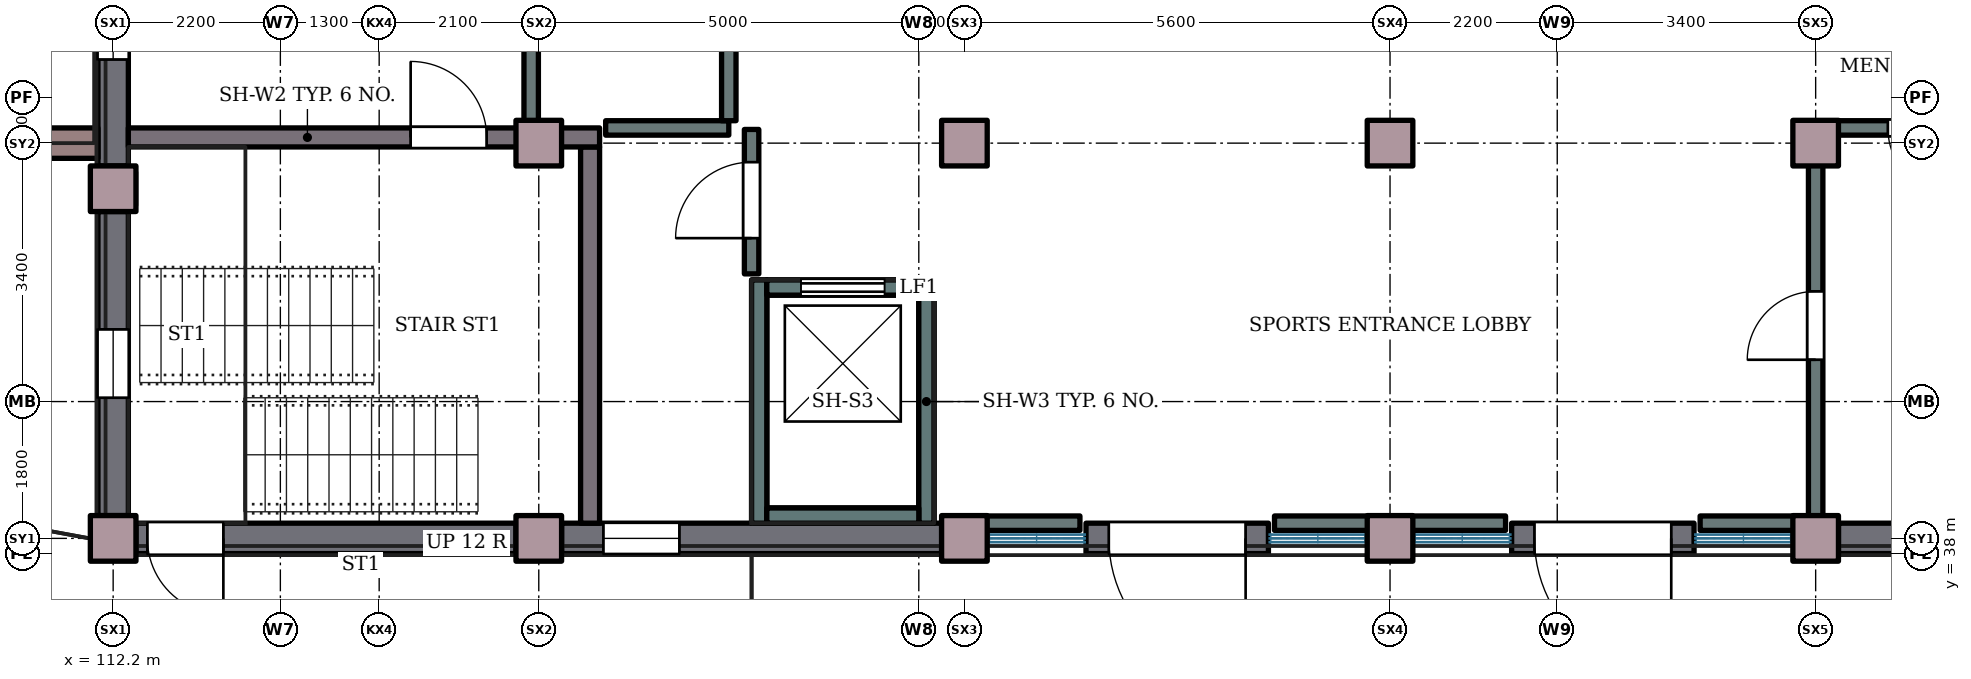
"""IFC4 building model, lengths in metres.
Left out: names, types, materials, properties, quantities, classifications, styles, units other than length and angle.
Written with IfcOpenShell. Run it as: python <this file> out.ifc"""

import sys

from ifc_helpers import new_model, si_unit, direction, frame, frame_2d, origin, origin_2d, place, context, subcontext, project, spatial, rectangle, extrude, element, fill, save


model = new_model("IFC4")
c1 = context("Model", 3, precision=1e-05, world=origin(), true_north=direction((0.0, 1.0)))
c2 = subcontext(c1, "Body", "Model", "MODEL_VIEW")
j1 = project(units=[si_unit("LENGTHUNIT", "METRE"), si_unit("PLANEANGLEUNIT", "RADIAN")], contexts=[c1])
p1 = place(None, origin())
s1 = spatial("IfcSite", under=j1, at=p1, CompositionType="ELEMENT")
p2 = place(p1, origin())
s2 = spatial("IfcBuilding", under=s1, at=p2, CompositionType="ELEMENT")
p3 = place(p2, origin())
s3 = spatial("IfcBuildingStorey", under=s2, at=p3, CompositionType="ELEMENT", Elevation=0.0)
for number, where, z_axis, x_axis in (
    (1, (112.2, 38.2, 0.0), (0.0, 0.0, 1.0), (1.0, 0.0, 0.0)),
    (2, (117.8, 38.2, 0.0), (0.0, 0.0, 1.0), (1.0, 0.0, 0.0)),
    (3, (123.4, 38.2, 0.0), (0.0, 0.0, 1.0), (1.0, 0.0, 0.0)),
    (4, (129.0, 38.2, 0.0), (0.0, 0.0, 1.0), (1.0, 0.0, 0.0)),
    (5, (134.6, 38.2, 0.0), (0.0, 0.0, 1.0), (1.0, 0.0, 0.0)),
    (6, (112.2, 42.8, 0.0), (0.0, 0.0, 1.0), (1.0, 0.0, 0.0)),
    (7, (117.8, 43.4, 0.0), (0.0, 0.0, 1.0), (1.0, 0.0, 0.0)),
    (8, (123.4, 43.4, 0.0), (0.0, 0.0, 1.0), (1.0, 0.0, 0.0)),
    (9, (129.0, 43.4, 0.0), (0.0, 0.0, 1.0), (1.0, 0.0, 0.0)),
    (10, (134.6, 43.4, 0.0), (0.0, 0.0, 1.0), (1.0, 0.0, 0.0)),
):
    element("IfcColumn", number, at=place(p3, frame(where, z_axis=z_axis, x_axis=x_axis)), inside=s3, PredefinedType="COLUMN", context=c2, shape_type="SweptSolid", body=[
        extrude(rectangle(XDim=0.6, YDim=0.6, at=origin_2d()), origin(), (0.0, 0.0, 1.0), 4.2),
    ])
p4 = place(p3, frame((117.5, 38.2, 0.0), z_axis=(0.0, 0.0, 1.0), x_axis=(-1.0, 0.0, 0.0)))
e11 = element("IfcWall", 11, at=p4, inside=s3, PredefinedType="SOLIDWALL", context=c2, shape_type="SweptSolid", body=[
    extrude(rectangle(XDim=5.0, YDim=0.4, at=frame_2d((2.5, 0.0))), origin(), (0.0, 0.0, 1.0), 4.2),
])
p5 = place(p4, frame((3.85, 0.0, 0.0)))
e12 = element("IfcOpeningElement", 12, at=p5, cuts=e11, PredefinedType="OPENING", context=c2, shape_type="SweptSolid", body=[
    extrude(rectangle(XDim=1.0, YDim=2.4, at=frame_2d((0.5, 1.2))), frame((0.0, 0.21, 0.0), z_axis=(0.0, -1.0, 0.0), x_axis=(1.0, 0.0, 0.0)), (0.0, 0.0, 1.0), 0.42),
])
p6 = place(p3, frame((123.1, 38.2, 0.0), z_axis=(0.0, 0.0, 1.0), x_axis=(-1.0, 0.0, 0.0)))
e13 = element("IfcWall", 13, at=p6, inside=s3, PredefinedType="SOLIDWALL", context=c2, shape_type="SweptSolid", body=[
    extrude(rectangle(XDim=5.0, YDim=0.4, at=frame_2d((2.5, 0.0))), origin(), (0.0, 0.0, 1.0), 4.2),
])
p7 = place(p6, frame((3.45, 0.0, 1.0)))
e14 = element("IfcOpeningElement", 14, at=p7, cuts=e13, PredefinedType="OPENING", context=c2, shape_type="SweptSolid", body=[
    extrude(rectangle(XDim=1.0, YDim=1.2, at=frame_2d((0.5, 0.6))), frame((0.0, 0.21, 0.0), z_axis=(0.0, -1.0, 0.0), x_axis=(1.0, 0.0, 0.0)), (0.0, 0.0, 1.0), 0.42),
])
p8 = place(p3, frame((127.4, 38.2, 0.0), z_axis=(0.0, 0.0, 1.0), x_axis=(-1.0, 0.0, 0.0)))
e15 = element("IfcWall", 15, at=p8, inside=s3, PredefinedType="SOLIDWALL", context=c2, shape_type="SweptSolid", body=[
    extrude(rectangle(XDim=2.4, YDim=0.4, at=frame_2d((1.2, 0.0))), origin(), (0.0, 0.0, 1.0), 4.2),
])
p9 = place(p8, frame((0.3, 0.0, 0.0)))
e16 = element("IfcOpeningElement", 16, at=p9, cuts=e15, PredefinedType="OPENING", context=c2, shape_type="SweptSolid", body=[
    extrude(rectangle(XDim=1.8, YDim=2.4, at=frame_2d((0.9, 1.2))), frame((0.0, 0.21, 0.0), z_axis=(0.0, -1.0, 0.0), x_axis=(1.0, 0.0, 0.0)), (0.0, 0.0, 1.0), 0.42),
])
p10 = place(p3, frame((133.0, 38.2, 0.0), z_axis=(0.0, 0.0, 1.0), x_axis=(-1.0, 0.0, 0.0)))
e17 = element("IfcWall", 17, at=p10, inside=s3, PredefinedType="SOLIDWALL", context=c2, shape_type="SweptSolid", body=[
    extrude(rectangle(XDim=2.4, YDim=0.4, at=frame_2d((1.2, 0.0))), origin(), (0.0, 0.0, 1.0), 4.2),
])
p11 = place(p10, frame((0.3, 0.0, 0.0)))
e18 = element("IfcOpeningElement", 18, at=p11, cuts=e17, PredefinedType="OPENING", context=c2, shape_type="SweptSolid", body=[
    extrude(rectangle(XDim=1.8, YDim=2.4, at=frame_2d((0.9, 1.2))), frame((0.0, 0.21, 0.0), z_axis=(0.0, -1.0, 0.0), x_axis=(1.0, 0.0, 0.0)), (0.0, 0.0, 1.0), 0.42),
])
p12 = place(p3, frame((139.9, 38.2, 0.0), z_axis=(0.0, 0.0, 1.0), x_axis=(-1.0, 0.0, 0.0)))
e19 = element("IfcWall", 19, at=p12, inside=s3, PredefinedType="SOLIDWALL", context=c2, shape_type="SweptSolid", body=[
    extrude(rectangle(XDim=5.0, YDim=0.4, at=frame_2d((2.5, 0.0))), origin(), (0.0, 0.0, 1.0), 4.2),
])
p13 = place(p12, frame((3.6, 0.0, 1.6)))
e20 = element("IfcOpeningElement", 20, at=p13, cuts=e19, PredefinedType="OPENING", context=c2, shape_type="SweptSolid", body=[
    extrude(rectangle(XDim=0.6, YDim=0.6, at=frame_2d((0.3, 0.3))), frame((0.0, 0.21, 0.0), z_axis=(0.0, -1.0, 0.0), x_axis=(1.0, 0.0, 0.0)), (0.0, 0.0, 1.0), 0.42),
])
p14 = place(p12, frame((0.9, 0.0, 1.6)))
e21 = element("IfcOpeningElement", 21, at=p14, cuts=e19, PredefinedType="OPENING", context=c2, shape_type="SweptSolid", body=[
    extrude(rectangle(XDim=0.6, YDim=0.6, at=frame_2d((0.3, 0.3))), frame((0.0, 0.21, 0.0), z_axis=(0.0, -1.0, 0.0), x_axis=(1.0, 0.0, 0.0)), (0.0, 0.0, 1.0), 0.42),
])
p15 = place(p3, frame((112.2, 38.5, 0.0), z_axis=(0.0, 0.0, 1.0), x_axis=(0.0, 1.0, 0.0)))
e22 = element("IfcWall", 22, at=p15, inside=s3, PredefinedType="SOLIDWALL", context=c2, shape_type="SweptSolid", body=[
    extrude(rectangle(XDim=4.0, YDim=0.4, at=frame_2d((2.0, 0.0))), origin(), (0.0, 0.0, 1.0), 4.2),
])
p16 = place(p15, frame((1.55, 0.0, 0.9)))
e23 = element("IfcOpeningElement", 23, at=p16, cuts=e22, PredefinedType="OPENING", context=c2, shape_type="SweptSolid", body=[
    extrude(rectangle(XDim=0.9, YDim=1.5, at=frame_2d((0.45, 0.75))), frame((0.0, 0.21, 0.0), z_axis=(0.0, -1.0, 0.0), x_axis=(1.0, 0.0, 0.0)), (0.0, 0.0, 1.0), 0.42),
])
p17 = place(p3, frame((112.2, 43.1, 0.0), z_axis=(0.0, 0.0, 1.0), x_axis=(0.0, 1.0, 0.0)))
e24 = element("IfcWall", 24, at=p17, inside=s3, PredefinedType="SOLIDWALL", context=c2, shape_type="SweptSolid", body=[
    extrude(rectangle(XDim=4.0, YDim=0.4, at=frame_2d((2.0, 0.0))), origin(), (0.0, 0.0, 1.0), 4.2),
])
p18 = place(p17, frame((1.4, 0.0, 1.2)))
e25 = element("IfcOpeningElement", 25, at=p18, cuts=e24, PredefinedType="OPENING", context=c2, shape_type="SweptSolid", body=[
    extrude(rectangle(XDim=1.2, YDim=1.8, at=frame_2d((0.6, 0.9))), frame((0.0, 0.21, 0.0), z_axis=(0.0, -1.0, 0.0), x_axis=(1.0, 0.0, 0.0)), (0.0, 0.0, 1.0), 0.42),
])
p19 = place(p3, frame((118.475, 38.4, 0.0), z_axis=(0.0, 0.0, 1.0), x_axis=(0.0, 1.0, 0.0)))
e26 = element("IfcWall", 26, at=p19, inside=s3, PredefinedType="SHEAR", context=c2, shape_type="SweptSolid", body=[
    extrude(rectangle(XDim=4.95, YDim=0.25, at=frame_2d((2.475, 0.0))), origin(), (0.0, 0.0, 1.0), 4.2),
])
p20 = place(p3, frame((112.4, 43.475, 0.0), z_axis=(0.0, 0.0, 1.0), x_axis=(1.0, 0.0, 0.0)))
e27 = element("IfcWall", 27, at=p20, inside=s3, PredefinedType="SHEAR", context=c2, shape_type="SweptSolid", body=[
    extrude(rectangle(XDim=6.2, YDim=0.25, at=frame_2d((3.1, 0.0))), origin(), (0.0, 0.0, 1.0), 4.2),
])
p21 = place(p20, frame((3.714, 0.0, 0.0)))
e28 = element("IfcOpeningElement", 28, at=p21, cuts=e27, PredefinedType="OPENING", context=c2, shape_type="SweptSolid", body=[
    extrude(rectangle(XDim=1.0, YDim=2.1, at=frame_2d((0.5, 1.05))), frame((0.0, 0.135, 0.0), z_axis=(0.0, -1.0, 0.0), x_axis=(1.0, 0.0, 0.0)), (0.0, 0.0, 1.0), 0.27),
])
for number, where, z_axis, x_axis in (
    (29, (120.7, 38.4, 0.0), (0.0, 0.0, 1.0), (0.0, 1.0, 0.0)),
    (30, (122.9, 38.4, 0.0), (0.0, 0.0, 1.0), (0.0, 1.0, 0.0)),
):
    element("IfcWall", number, at=place(p3, frame(where, z_axis=z_axis, x_axis=x_axis)), inside=s3, PredefinedType="SHEAR", context=c2, shape_type="SweptSolid", body=[
        extrude(rectangle(XDim=3.2, YDim=0.2, at=frame_2d((1.6, 0.0))), origin(), (0.0, 0.0, 1.0), 4.2),
    ])
p22 = place(p3, frame((120.8, 38.5, 0.0), z_axis=(0.0, 0.0, 1.0), x_axis=(1.0, 0.0, 0.0)))
e31 = element("IfcWall", 31, at=p22, inside=s3, PredefinedType="SHEAR", context=c2, shape_type="SweptSolid", body=[
    extrude(rectangle(XDim=2.0, YDim=0.2, at=frame_2d((1.0, 0.0))), origin(), (0.0, 0.0, 1.0), 4.2),
])
p23 = place(p3, frame((120.8, 41.5, 0.0), z_axis=(0.0, 0.0, 1.0), x_axis=(1.0, 0.0, 0.0)))
e32 = element("IfcWall", 32, at=p23, inside=s3, PredefinedType="SHEAR", context=c2, shape_type="SweptSolid", body=[
    extrude(rectangle(XDim=2.0, YDim=0.2, at=frame_2d((1.0, 0.0))), origin(), (0.0, 0.0, 1.0), 4.2),
])
p24 = place(p23, frame((0.45, 0.0, 0.0)))
e33 = element("IfcOpeningElement", 33, at=p24, cuts=e32, PredefinedType="OPENING", context=c2, shape_type="SweptSolid", body=[
    extrude(rectangle(XDim=1.1, YDim=2.1, at=frame_2d((0.55, 1.05))), frame((0.0, 0.11, 0.0), z_axis=(0.0, -1.0, 0.0), x_axis=(1.0, 0.0, 0.0)), (0.0, 0.0, 1.0), 0.22),
])
for number, where, z_axis, x_axis in (
    (34, (120.7, 38.4, -1.4), (0.0, 0.0, 1.0), (0.0, 1.0, 0.0)),
    (35, (122.9, 38.4, -1.4), (0.0, 0.0, 1.0), (0.0, 1.0, 0.0)),
):
    element("IfcWall", number, at=place(p3, frame(where, z_axis=z_axis, x_axis=x_axis)), inside=s3, PredefinedType="SHEAR", context=c2, shape_type="SweptSolid", body=[
        extrude(rectangle(XDim=3.2, YDim=0.2, at=frame_2d((1.6, 0.0))), origin(), (0.0, 0.0, 1.0), 1.4),
    ])
for number, where, z_axis, x_axis in (
    (36, (120.8, 38.5, -1.4), (0.0, 0.0, 1.0), (1.0, 0.0, 0.0)),
    (37, (120.8, 41.5, -1.4), (0.0, 0.0, 1.0), (1.0, 0.0, 0.0)),
):
    element("IfcWall", number, at=place(p3, frame(where, z_axis=z_axis, x_axis=x_axis)), inside=s3, PredefinedType="SHEAR", context=c2, shape_type="SweptSolid", body=[
        extrude(rectangle(XDim=2.0, YDim=0.2, at=frame_2d((1.0, 0.0))), origin(), (0.0, 0.0, 1.0), 1.4),
    ])
p25 = place(p3, frame((110.3, 43.4, 0.0), z_axis=(0.0, 0.0, 1.0), x_axis=(1.0, 0.0, 0.0)))
e38 = element("IfcWall", 38, at=p25, inside=s3, PredefinedType="STANDARD", context=c2, shape_type="SweptSolid", body=[
    extrude(rectangle(XDim=1.7, YDim=0.4, at=frame_2d((0.85, 0.0))), origin(), (0.0, 0.0, 1.0), 4.2),
])
for number, where, z_axis, x_axis in (
    (39, (112.4, 43.02, 0.0), (0.0, 0.0, 1.0), (0.0, -1.0, 0.0)),
    (40, (117.58, 38.4, 0.0), (0.0, 0.0, 1.0), (1.0, 0.0, 0.0)),
):
    element("IfcWall", number, at=place(p3, frame(where, z_axis=z_axis, x_axis=x_axis)), inside=s3, PredefinedType="PARTITIONING", context=c2, shape_type="SweptSolid", body=[
        extrude(rectangle(XDim=0.44, YDim=0.19, at=frame_2d((0.22, 0.0))), origin(), (0.0, 0.0, 1.0), 3.9),
    ])
p26 = place(p3, frame((117.7, 43.68, 0.0), z_axis=(0.0, 0.0, 1.0), x_axis=(0.0, 1.0, 0.0)))
e41 = element("IfcWall", 41, at=p26, inside=s3, PredefinedType="PARTITIONING", context=c2, shape_type="SweptSolid", body=[
    extrude(rectangle(XDim=2.92, YDim=0.19, at=frame_2d((1.46, 0.0))), origin(), (0.0, 0.0, 1.0), 3.9),
])
p27 = place(p3, frame((120.3, 43.6, 0.0), z_axis=(0.0, 0.0, 1.0), x_axis=(-1.0, 0.0, 0.0)))
e42 = element("IfcWall", 42, at=p27, inside=s3, PredefinedType="PARTITIONING", context=c2, shape_type="SweptSolid", body=[
    extrude(rectangle(XDim=1.62, YDim=0.19, at=frame_2d((0.81, 0.0))), origin(), (0.0, 0.0, 1.0), 3.9),
])
p28 = place(p3, frame((120.3, 43.695, 0.0), z_axis=(0.0, 0.0, 1.0), x_axis=(0.0, 1.0, 0.0)))
e43 = element("IfcWall", 43, at=p28, inside=s3, PredefinedType="PARTITIONING", context=c2, shape_type="SweptSolid", body=[
    extrude(rectangle(XDim=2.905, YDim=0.19, at=frame_2d((1.453, 0.0))), origin(), (0.0, 0.0, 1.0), 3.9),
])
p29 = place(p28, frame((0.955, 0.0, 0.0)))
e44 = element("IfcOpeningElement", 44, at=p29, cuts=e43, PredefinedType="OPENING", context=c2, shape_type="SweptSolid", body=[
    extrude(rectangle(XDim=0.9, YDim=2.1, at=frame_2d((0.45, 1.05))), frame((0.0, 0.105, 0.0), z_axis=(0.0, -1.0, 0.0), x_axis=(1.0, 0.0, 0.0)), (0.0, 0.0, 1.0), 0.21),
])
p30 = place(p3, frame((120.6, 41.68, 0.0), z_axis=(0.0, 0.0, 1.0), x_axis=(0.0, 1.0, 0.0)))
e45 = element("IfcWall", 45, at=p30, inside=s3, PredefinedType="PARTITIONING", context=c2, shape_type="SweptSolid", body=[
    extrude(rectangle(XDim=1.9, YDim=0.19, at=frame_2d((0.95, 0.0))), origin(), (0.0, 0.0, 1.0), 3.9),
])
p31 = place(p30, frame((0.47, 0.0, 0.0)))
e46 = element("IfcOpeningElement", 46, at=p31, cuts=e45, PredefinedType="OPENING", context=c2, shape_type="SweptSolid", body=[
    extrude(rectangle(XDim=1.0, YDim=2.1, at=frame_2d((0.5, 1.05))), frame((0.0, 0.105, 0.0), z_axis=(0.0, -1.0, 0.0), x_axis=(1.0, 0.0, 0.0)), (0.0, 0.0, 1.0), 0.21),
])
p32 = place(p3, frame((123.42, 38.4, 0.0), z_axis=(0.0, 0.0, 1.0), x_axis=(1.0, 0.0, 0.0)))
e47 = element("IfcWall", 47, at=p32, inside=s3, PredefinedType="PARTITIONING", context=c2, shape_type="SweptSolid", body=[
    extrude(rectangle(XDim=1.5, YDim=0.19, at=frame_2d((0.75, 0.0))), origin(), (0.0, 0.0, 1.0), 3.9),
])
p33 = place(p3, frame((127.48, 38.4, 0.0), z_axis=(0.0, 0.0, 1.0), x_axis=(1.0, 0.0, 0.0)))
e48 = element("IfcWall", 48, at=p33, inside=s3, PredefinedType="PARTITIONING", context=c2, shape_type="SweptSolid", body=[
    extrude(rectangle(XDim=3.04, YDim=0.19, at=frame_2d((1.52, 0.0))), origin(), (0.0, 0.0, 1.0), 3.9),
])
p34 = place(p3, frame((133.08, 38.4, 0.0), z_axis=(0.0, 0.0, 1.0), x_axis=(1.0, 0.0, 0.0)))
e49 = element("IfcWall", 49, at=p34, inside=s3, PredefinedType="PARTITIONING", context=c2, shape_type="SweptSolid", body=[
    extrude(rectangle(XDim=1.52, YDim=0.19, at=frame_2d((0.76, 0.0))), origin(), (0.0, 0.0, 1.0), 3.9),
])
p35 = place(p3, frame((134.6, 38.495, 0.0), z_axis=(0.0, 0.0, 1.0), x_axis=(0.0, 1.0, 0.0)))
e50 = element("IfcWall", 50, at=p35, inside=s3, PredefinedType="PARTITIONING", context=c2, shape_type="SweptSolid", body=[
    extrude(rectangle(XDim=5.085, YDim=0.19, at=frame_2d((2.542, 0.0))), origin(), (0.0, 0.0, 1.0), 3.9),
])
p36 = place(p35, frame((2.055, 0.0, 0.0)))
e51 = element("IfcOpeningElement", 51, at=p36, cuts=e50, PredefinedType="OPENING", context=c2, shape_type="SweptSolid", body=[
    extrude(rectangle(XDim=0.9, YDim=2.1, at=frame_2d((0.45, 1.05))), frame((0.0, 0.105, 0.0), z_axis=(0.0, -1.0, 0.0), x_axis=(1.0, 0.0, 0.0)), (0.0, 0.0, 1.0), 0.21),
])
p37 = place(p3, frame((137.305, 43.6, 0.0), z_axis=(0.0, 0.0, 1.0), x_axis=(-1.0, 0.0, 0.0)))
e52 = element("IfcWall", 52, at=p37, inside=s3, PredefinedType="PARTITIONING", context=c2, shape_type="SweptSolid", body=[
    extrude(rectangle(XDim=2.685, YDim=0.19, at=frame_2d((1.342, 0.0))), origin(), (0.0, 0.0, 1.0), 3.9),
])
p38 = place(p37, frame((0.855, 0.0, 0.0)))
e53 = element("IfcOpeningElement", 53, at=p38, cuts=e52, PredefinedType="OPENING", context=c2, shape_type="SweptSolid", body=[
    extrude(rectangle(XDim=0.9, YDim=2.1, at=frame_2d((0.45, 1.05))), frame((0.0, 0.105, 0.0), z_axis=(0.0, -1.0, 0.0), x_axis=(1.0, 0.0, 0.0)), (0.0, 0.0, 1.0), 0.21),
])
p39 = place(p9, origin())
e54 = element("IfcDoor", 54, at=p39, inside=s3, OperationType="DOUBLE_DOOR_SINGLE_SWING", PredefinedType="DOOR", context=c2, shape_type="SweptSolid", body=[
    extrude(rectangle(XDim=1.8, YDim=2.4, at=frame_2d((0.9, 1.2))), frame((0.0, 0.025, 0.0), z_axis=(0.0, -1.0, 0.0), x_axis=(1.0, 0.0, 0.0)), (0.0, 0.0, 1.0), 0.05),
])
fill(e16, e54)
p40 = place(p11, origin())
e55 = element("IfcDoor", 55, at=p40, inside=s3, OperationType="DOUBLE_DOOR_SINGLE_SWING", PredefinedType="DOOR", context=c2, shape_type="SweptSolid", body=[
    extrude(rectangle(XDim=1.8, YDim=2.4, at=frame_2d((0.9, 1.2))), frame((0.0, 0.025, 0.0), z_axis=(0.0, -1.0, 0.0), x_axis=(1.0, 0.0, 0.0)), (0.0, 0.0, 1.0), 0.05),
])
fill(e18, e55)
p41 = place(p5, origin())
e56 = element("IfcDoor", 56, at=p41, inside=s3, OperationType="SINGLE_SWING_LEFT", PredefinedType="DOOR", context=c2, shape_type="SweptSolid", body=[
    extrude(rectangle(XDim=1.0, YDim=2.4, at=frame_2d((0.5, 1.2))), frame((0.0, 0.025, 0.0), z_axis=(0.0, -1.0, 0.0), x_axis=(1.0, 0.0, 0.0)), (0.0, 0.0, 1.0), 0.05),
])
fill(e12, e56)
p42 = place(p7, origin())
e57 = element("IfcWindow", 57, at=p42, inside=s3, PartitioningType="SINGLE_PANEL", PredefinedType="WINDOW", context=c2, shape_type="SweptSolid", body=[
    extrude(rectangle(XDim=1.0, YDim=1.2, at=frame_2d((0.5, 0.6))), frame((0.0, 0.03, 0.0), z_axis=(0.0, -1.0, 0.0), x_axis=(1.0, 0.0, 0.0)), (0.0, 0.0, 1.0), 0.06),
])
fill(e14, e57)
p43 = place(p16, origin())
e58 = element("IfcWindow", 58, at=p43, inside=s3, PartitioningType="SINGLE_PANEL", PredefinedType="WINDOW", context=c2, shape_type="SweptSolid", body=[
    extrude(rectangle(XDim=0.9, YDim=1.5, at=frame_2d((0.45, 0.75))), frame((0.0, 0.03, 0.0), z_axis=(0.0, -1.0, 0.0), x_axis=(1.0, 0.0, 0.0)), (0.0, 0.0, 1.0), 0.06),
])
fill(e23, e58)
p44 = place(p18, origin())
e59 = element("IfcWindow", 59, at=p44, inside=s3, PartitioningType="SINGLE_PANEL", PredefinedType="WINDOW", context=c2, shape_type="SweptSolid", body=[
    extrude(rectangle(XDim=1.2, YDim=1.8, at=frame_2d((0.6, 0.9))), frame((0.0, 0.03, 0.0), z_axis=(0.0, -1.0, 0.0), x_axis=(1.0, 0.0, 0.0)), (0.0, 0.0, 1.0), 0.06),
])
fill(e25, e59)
p45 = place(p24, origin())
e60 = element("IfcDoor", 60, at=p45, inside=s3, OperationType="SLIDING_TO_LEFT", PredefinedType="DOOR", context=c2, shape_type="SweptSolid", body=[
    extrude(rectangle(XDim=1.1, YDim=2.1, at=frame_2d((0.55, 1.05))), frame((0.0, 0.025, 0.0), z_axis=(0.0, -1.0, 0.0), x_axis=(1.0, 0.0, 0.0)), (0.0, 0.0, 1.0), 0.05),
])
fill(e33, e60)
p46 = place(p31, origin())
e61 = element("IfcDoor", 61, at=p46, inside=s3, OperationType="SINGLE_SWING_LEFT", PredefinedType="DOOR", context=c2, shape_type="SweptSolid", body=[
    extrude(rectangle(XDim=1.0, YDim=2.1, at=frame_2d((0.5, 1.05))), frame((0.0, 0.025, 0.0), z_axis=(0.0, -1.0, 0.0), x_axis=(1.0, 0.0, 0.0)), (0.0, 0.0, 1.0), 0.05),
])
fill(e46, e61)
p47 = place(p36, origin())
e62 = element("IfcDoor", 62, at=p47, inside=s3, OperationType="SINGLE_SWING_LEFT", PredefinedType="DOOR", context=c2, shape_type="SweptSolid", body=[
    extrude(rectangle(XDim=0.9, YDim=2.1, at=frame_2d((0.45, 1.05))), frame((0.0, 0.025, 0.0), z_axis=(0.0, -1.0, 0.0), x_axis=(1.0, 0.0, 0.0)), (0.0, 0.0, 1.0), 0.05),
])
fill(e51, e62)
p48 = place(p38, origin())
e63 = element("IfcDoor", 63, at=p48, inside=s3, OperationType="SINGLE_SWING_LEFT", PredefinedType="DOOR", context=c2, shape_type="SweptSolid", body=[
    extrude(rectangle(XDim=0.9, YDim=2.1, at=frame_2d((0.45, 1.05))), frame((0.0, 0.025, 0.0), z_axis=(0.0, -1.0, 0.0), x_axis=(1.0, 0.0, 0.0)), (0.0, 0.0, 1.0), 0.05),
])
fill(e53, e63)
p49 = place(p21, origin())
e64 = element("IfcDoor", 64, at=p49, inside=s3, OperationType="SINGLE_SWING_LEFT", PredefinedType="DOOR", context=c2, shape_type="SweptSolid", body=[
    extrude(rectangle(XDim=1.0, YDim=2.1, at=frame_2d((0.5, 1.05))), frame((0.0, 0.025, 0.0), z_axis=(0.0, -1.0, 0.0), x_axis=(1.0, 0.0, 0.0)), (0.0, 0.0, 1.0), 0.05),
])
fill(e28, e64)
save(model, sys.argv[1])
